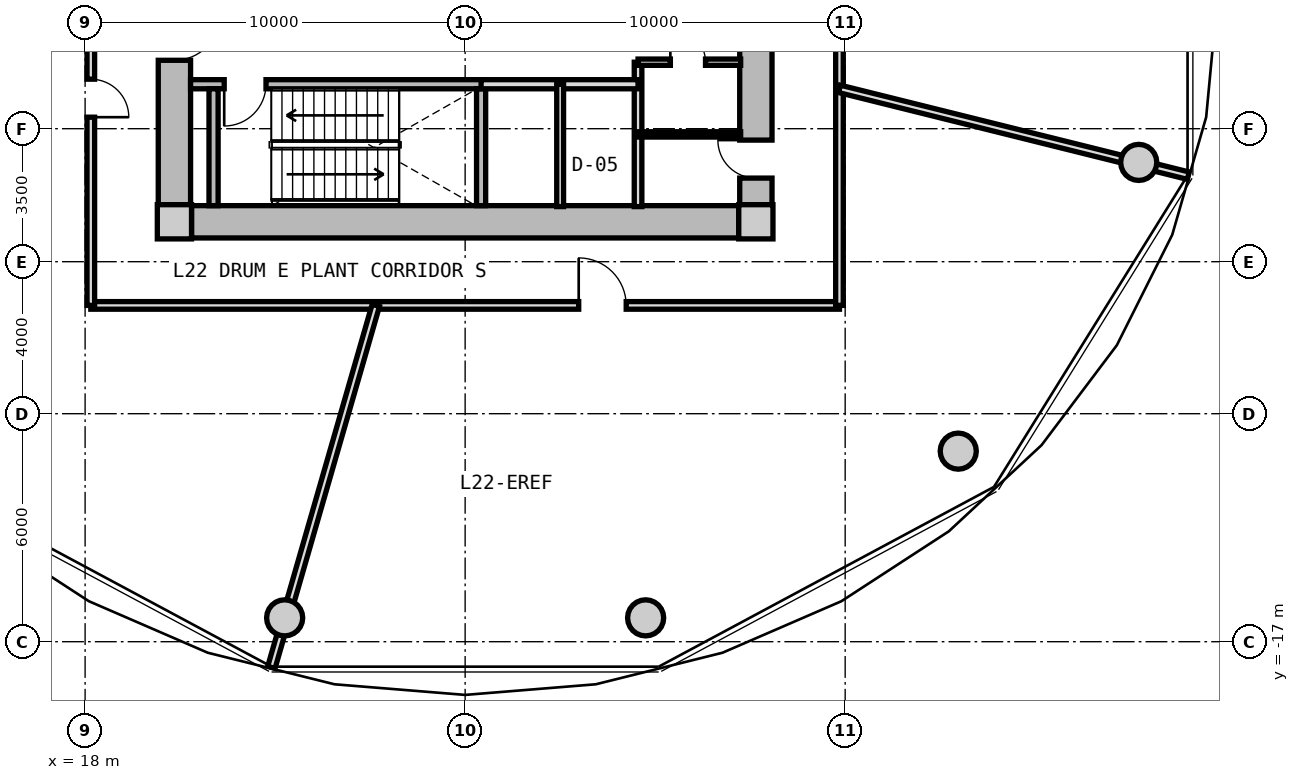
"""IFC4 building model, lengths in metres.
Left out: names, types, materials, properties, quantities, classifications, styles, units other than length and angle.
Written with IfcOpenShell. Run it as: python <this file> out.ifc"""

import sys

from ifc_helpers import new_model, si_unit, direction, frame, frame_2d, origin, origin_2d, place, context, subcontext, project, spatial, rectangle, circle, extrude, source, transform, mapped, element, fill, save


model = new_model("IFC4")
c1 = context("Model", 3, precision=1e-05, world=origin(), true_north=direction((0.0, 1.0)))
c2 = subcontext(c1, "Body", "Model", "MODEL_VIEW")
j1 = project(units=[si_unit("LENGTHUNIT", "METRE"), si_unit("PLANEANGLEUNIT", "RADIAN")], contexts=[c1])
p1 = place(None, origin())
s1 = spatial("IfcSite", under=j1, at=p1, CompositionType="ELEMENT")
p2 = place(p1, origin())
s2 = spatial("IfcBuilding", under=s1, at=p2, CompositionType="ELEMENT")
p3 = place(p2, frame((0.0, 0.0, 73.45)))
s3 = spatial("IfcBuildingStorey", under=s2, at=p3, CompositionType="ELEMENT", Elevation=73.45)
m1 = source(origin(), c2, "Body", "SweptSolid", [
    extrude(rectangle(XDim=0.9, YDim=0.9, at=origin_2d()), origin(), (0.0, 0.0, 1.0), 4.5),
])
for number, where, z_axis, x_axis in (
    (1, (20.35, -5.95, 0.0), (0.0, 0.0, 1.0), (1.0, 0.0, 0.0)),
    (2, (35.65, -5.95, 0.0), (0.0, 0.0, 1.0), (1.0, 0.0, 0.0)),
):
    element("IfcColumn", number, at=place(p3, frame(where, z_axis=z_axis, x_axis=x_axis)), inside=s3, PredefinedType="COLUMN", context=c2, shape_type="MappedRepresentation", body=[
        mapped(m1, transform((0.0, 0.0, 0.0), x_axis=(1.0, 0.0, 0.0), y_axis=(0.0, 1.0, 0.0), z_axis=(0.0, 0.0, 1.0), scale=1.0)),
    ])
m2 = source(origin(), c2, "Body", "SweptSolid", [
    extrude(rectangle(XDim=14.4, YDim=0.85, at=frame_2d((7.2, 0.0))), origin(), (0.0, 0.0, 1.0), 4.08),
])
p4 = place(p3, frame((35.2, -5.95, 0.0), z_axis=(0.0, 0.0, 1.0), x_axis=(-1.0, 0.0, 0.0)))
e3 = element("IfcWall", 3, at=p4, inside=s3, PredefinedType="SHEAR", context=c2, shape_type="MappedRepresentation", body=[
    mapped(m2, transform((0.0, 0.0, 0.0), x_axis=(1.0, 0.0, 0.0), y_axis=(0.0, 1.0, 0.0), z_axis=(0.0, 0.0, 1.0), scale=1.0)),
])
m3 = source(origin(), c2, "Body", "SweptSolid", [
    extrude(rectangle(XDim=11.0, YDim=0.85, at=frame_2d((5.5, 0.0))), origin(), (0.0, 0.0, 1.0), 4.08),
])
p5 = place(p3, frame((20.35, -5.5, 0.0), z_axis=(0.0, 0.0, 1.0), x_axis=(0.0, 1.0, 0.0)))
e4 = element("IfcWall", 4, at=p5, inside=s3, PredefinedType="SHEAR", context=c2, shape_type="MappedRepresentation", body=[
    mapped(m3, transform((0.0, 0.0, 0.0), x_axis=(1.0, 0.0, 0.0), y_axis=(0.0, 1.0, 0.0), z_axis=(0.0, 0.0, 1.0), scale=1.0)),
])
p6 = place(p5, frame((3.8, 0.0, 0.0)))
e5 = element("IfcOpeningElement", 5, at=p6, cuts=e4, PredefinedType="OPENING", context=c2, shape_type="SweptSolid", body=[
    extrude(rectangle(XDim=1.2, YDim=2.15, at=frame_2d((0.6, 1.075))), frame((0.0, 0.435, 0.0), z_axis=(0.0, -1.0, 0.0), x_axis=(1.0, 0.0, 0.0)), (0.0, 0.0, 1.0), 0.87),
])
p7 = place(p3, frame((35.65, 5.5, 0.0), z_axis=(0.0, 0.0, 1.0), x_axis=(0.0, -1.0, 0.0)))
e6 = element("IfcWall", 6, at=p7, inside=s3, PredefinedType="SHEAR", context=c2, shape_type="MappedRepresentation", body=[
    mapped(m3, transform((0.0, 0.0, 0.0), x_axis=(1.0, 0.0, 0.0), y_axis=(0.0, 1.0, 0.0), z_axis=(0.0, 0.0, 1.0), scale=1.0)),
])
p8 = place(p7, frame((5.65, 0.0, 0.0)))
e7 = element("IfcOpeningElement", 7, at=p8, cuts=e6, PredefinedType="OPENING", context=c2, shape_type="SweptSolid", body=[
    extrude(rectangle(XDim=1.2, YDim=2.15, at=frame_2d((0.6, 1.075))), frame((0.0, 0.435, 0.0), z_axis=(0.0, -1.0, 0.0), x_axis=(1.0, 0.0, 0.0)), (0.0, 0.0, 1.0), 0.87),
])
p9 = place(p7, frame((9.3, 0.0, 0.0)))
e8 = element("IfcOpeningElement", 8, at=p9, cuts=e6, PredefinedType="OPENING", context=c2, shape_type="SweptSolid", body=[
    extrude(rectangle(XDim=1.0, YDim=2.1, at=frame_2d((0.5, 1.05))), frame((0.0, 0.435, 0.0), z_axis=(0.0, -1.0, 0.0), x_axis=(1.0, 0.0, 0.0)), (0.0, 0.0, 1.0), 0.87),
])
m4 = source(origin(), c2, "Body", "SweptSolid", [
    extrude(circle(Radius=0.475, at=origin_2d()), origin(), (0.0, 0.0, 1.0), 4.08),
])
for number, where, z_axis, x_axis in (
    (9, (23.251, -16.373, 0.0), (0.0, 0.0, 1.0), (1.0, 0.0, 0.0)),
    (10, (32.749, -16.373, 0.0), (0.0, 0.0, 1.0), (1.0, 0.0, 0.0)),
    (11, (40.975, -11.985, 0.0), (0.0, 0.0, 1.0), (1.0, 0.0, 0.0)),
    (12, (45.725, -4.387, 0.0), (0.0, 0.0, 1.0), (1.0, 0.0, 0.0)),
):
    element("IfcColumn", number, at=place(p3, frame(where, z_axis=z_axis, x_axis=x_axis)), inside=s3, PredefinedType="COLUMN", context=c2, shape_type="MappedRepresentation", body=[
        mapped(m4, transform((0.0, 0.0, 0.0), x_axis=(1.0, 0.0, 0.0), y_axis=(0.0, 1.0, 0.0), z_axis=(0.0, 0.0, 1.0), scale=1.0)),
    ])
m5 = source(origin(), c2, "Body", "SweptSolid", [
    extrude(rectangle(XDim=7.765, YDim=0.24, at=frame_2d((3.883, 0.0))), origin(), (0.0, 0.0, 1.0), 4.08),
])
p10 = place(p3, frame((20.775, -2.33, 0.0), z_axis=(0.0, 0.0, 1.0), x_axis=(1.0, 0.0, 0.0)))
e13 = element("IfcWall", 13, at=p10, inside=s3, PredefinedType="PARTITIONING", context=c2, shape_type="MappedRepresentation", body=[
    mapped(m5, transform((0.0, 0.0, 0.0), x_axis=(1.0, 0.0, 0.0), y_axis=(0.0, 1.0, 0.0), z_axis=(0.0, 0.0, 1.0), scale=1.0)),
])
p11 = place(p10, frame((0.885, 0.0, 0.0)))
e14 = element("IfcOpeningElement", 14, at=p11, cuts=e13, PredefinedType="OPENING", context=c2, shape_type="SweptSolid", body=[
    extrude(rectangle(XDim=1.1, YDim=2.15, at=frame_2d((0.55, 1.075))), frame((0.0, 0.13, 0.0), z_axis=(0.0, -1.0, 0.0), x_axis=(1.0, 0.0, 0.0)), (0.0, 0.0, 1.0), 0.26),
])
m6 = source(origin(), c2, "Body", "SweptSolid", [
    extrude(rectangle(XDim=3.075, YDim=0.24, at=frame_2d((1.538, 0.0))), origin(), (0.0, 0.0, 1.0), 4.08),
])
for number, where, z_axis, x_axis in (
    (15, (21.38, -5.525, 0.0), (0.0, 0.0, 1.0), (0.0, 1.0, 0.0)),
    (16, (28.42, -5.525, 0.0), (0.0, 0.0, 1.0), (0.0, 1.0, 0.0)),
):
    element("IfcWall", number, at=place(p3, frame(where, z_axis=z_axis, x_axis=x_axis)), inside=s3, PredefinedType="PARTITIONING", context=c2, shape_type="MappedRepresentation", body=[
        mapped(m6, transform((0.0, 0.0, 0.0), x_axis=(1.0, 0.0, 0.0), y_axis=(0.0, 1.0, 0.0), z_axis=(0.0, 0.0, 1.0), scale=1.0)),
    ])
m7 = source(origin(), c2, "Body", "SweptSolid", [
    extrude(rectangle(XDim=3.8, YDim=0.2, at=frame_2d((1.9, 0.0))), origin(), (0.0, 0.0, 1.0), 4.065),
])
p12 = place(p3, frame((32.55, -5.55, 0.0), z_axis=(0.0, 0.0, 1.0), x_axis=(0.0, 1.0, 0.0)))
e17 = element("IfcWall", 17, at=p12, inside=s3, PredefinedType="PARTITIONING", context=c2, shape_type="MappedRepresentation", body=[
    mapped(m7, transform((0.0, 0.0, 0.0), x_axis=(1.0, 0.0, 0.0), y_axis=(0.0, 1.0, 0.0), z_axis=(0.0, 0.0, 1.0), scale=1.0)),
])
m8 = source(origin(), c2, "Body", "SweptSolid", [
    extrude(rectangle(XDim=4.13, YDim=0.24, at=frame_2d((2.065, 0.0))), origin(), (0.0, 0.0, 1.0), 4.065),
])
p13 = place(p3, frame((28.42, -2.33, 0.0), z_axis=(0.0, 0.0, 1.0), x_axis=(1.0, 0.0, 0.0)))
e18 = element("IfcWall", 18, at=p13, inside=s3, PredefinedType="PARTITIONING", context=c2, shape_type="MappedRepresentation", body=[
    mapped(m8, transform((0.0, 0.0, 0.0), x_axis=(1.0, 0.0, 0.0), y_axis=(0.0, 1.0, 0.0), z_axis=(0.0, 0.0, 1.0), scale=1.0)),
])
m9 = source(origin(), c2, "Body", "SweptSolid", [
    extrude(rectangle(XDim=3.22, YDim=0.18, at=frame_2d((1.61, 0.0))), origin(), (0.0, 0.0, 1.0), 4.065),
])
p14 = place(p3, frame((30.5, -5.55, 0.0), z_axis=(0.0, 0.0, 1.0), x_axis=(0.0, 1.0, 0.0)))
e19 = element("IfcWall", 19, at=p14, inside=s3, PredefinedType="PARTITIONING", context=c2, shape_type="MappedRepresentation", body=[
    mapped(m9, transform((0.0, 0.0, 0.0), x_axis=(1.0, 0.0, 0.0), y_axis=(0.0, 1.0, 0.0), z_axis=(0.0, 0.0, 1.0), scale=1.0)),
])
m10 = source(origin(), c2, "Body", "SweptSolid", [
    extrude(rectangle(XDim=2.7, YDim=0.165, at=frame_2d((1.35, 0.0))), origin(), (0.0, 0.0, 1.0), 4.065),
])
p15 = place(p3, frame((32.55, -1.75, 0.0), z_axis=(0.0, 0.0, 1.0), x_axis=(1.0, 0.0, 0.0)))
e20 = element("IfcWall", 20, at=p15, inside=s3, PredefinedType="PARTITIONING", context=c2, shape_type="MappedRepresentation", body=[
    mapped(m10, transform((0.0, 0.0, 0.0), x_axis=(1.0, 0.0, 0.0), y_axis=(0.0, 1.0, 0.0), z_axis=(0.0, 0.0, 1.0), scale=1.0)),
])
p16 = place(p15, frame((0.85, 0.0, 0.0)))
e21 = element("IfcOpeningElement", 21, at=p16, cuts=e20, PredefinedType="OPENING", context=c2, shape_type="SweptSolid", body=[
    extrude(rectangle(XDim=0.925, YDim=2.1, at=frame_2d((0.462, 1.05))), frame((0.0, 0.093, 0.0), z_axis=(0.0, -1.0, 0.0), x_axis=(1.0, 0.0, 0.0)), (0.0, 0.0, 1.0), 0.185),
])
m11 = source(origin(), c2, "Body", "SweptSolid", [
    extrude(rectangle(XDim=2.7, YDim=0.14, at=frame_2d((1.35, 0.0))), origin(), (0.0, 0.0, 1.0), 4.065),
])
p17 = place(p3, frame((32.55, -3.65, 0.0), z_axis=(0.0, 0.0, 1.0), x_axis=(1.0, 0.0, 0.0)))
e22 = element("IfcWall", 22, at=p17, inside=s3, PredefinedType="PARTITIONING", context=c2, shape_type="MappedRepresentation", body=[
    mapped(m11, transform((0.0, 0.0, 0.0), x_axis=(1.0, 0.0, 0.0), y_axis=(0.0, 1.0, 0.0), z_axis=(0.0, 0.0, 1.0), scale=1.0)),
])
m12 = source(origin(), c2, "Body", "SweptSolid", [
    extrude(rectangle(XDim=19.7, YDim=0.2, at=frame_2d((9.85, 0.0))), origin(), (0.0, 0.0, 1.0), 4.065),
])
p18 = place(p3, frame((37.85, -8.15, 0.0), z_axis=(0.0, 0.0, 1.0), x_axis=(-1.0, 0.0, 0.0)))
e23 = element("IfcWall", 23, at=p18, inside=s3, PredefinedType="PARTITIONING", context=c2, shape_type="MappedRepresentation", body=[
    mapped(m12, transform((0.0, 0.0, 0.0), x_axis=(1.0, 0.0, 0.0), y_axis=(0.0, 1.0, 0.0), z_axis=(0.0, 0.0, 1.0), scale=1.0)),
])
p19 = place(p18, frame((5.612, 0.0, 0.0)))
e24 = element("IfcOpeningElement", 24, at=p19, cuts=e23, PredefinedType="OPENING", context=c2, shape_type="SweptSolid", body=[
    extrude(rectangle(XDim=1.25, YDim=2.2, at=frame_2d((0.625, 1.1))), frame((0.0, 0.11, 0.0), z_axis=(0.0, -1.0, 0.0), x_axis=(1.0, 0.0, 0.0)), (0.0, 0.0, 1.0), 0.22),
])
m13 = source(origin(), c2, "Body", "SweptSolid", [
    extrude(rectangle(XDim=16.3, YDim=0.2, at=frame_2d((8.15, 0.0))), origin(), (0.0, 0.0, 1.0), 4.065),
])
p20 = place(p3, frame((18.15, -8.15, 0.0), z_axis=(0.0, 0.0, 1.0), x_axis=(0.0, 1.0, 0.0)))
e25 = element("IfcWall", 25, at=p20, inside=s3, PredefinedType="PARTITIONING", context=c2, shape_type="MappedRepresentation", body=[
    mapped(m13, transform((0.0, 0.0, 0.0), x_axis=(1.0, 0.0, 0.0), y_axis=(0.0, 1.0, 0.0), z_axis=(0.0, 0.0, 1.0), scale=1.0)),
])
p21 = place(p20, frame((4.953, 0.0, 0.0)))
e26 = element("IfcOpeningElement", 26, at=p21, cuts=e25, PredefinedType="OPENING", context=c2, shape_type="SweptSolid", body=[
    extrude(rectangle(XDim=1.0, YDim=2.1, at=frame_2d((0.5, 1.05))), frame((0.0, 0.11, 0.0), z_axis=(0.0, -1.0, 0.0), x_axis=(1.0, 0.0, 0.0)), (0.0, 0.0, 1.0), 0.22),
])
p22 = place(p3, frame((37.85, 8.15, 0.0), z_axis=(0.0, 0.0, 1.0), x_axis=(0.0, -1.0, 0.0)))
e27 = element("IfcWall", 27, at=p22, inside=s3, PredefinedType="PARTITIONING", context=c2, shape_type="MappedRepresentation", body=[
    mapped(m13, transform((0.0, 0.0, 0.0), x_axis=(1.0, 0.0, 0.0), y_axis=(0.0, 1.0, 0.0), z_axis=(0.0, 0.0, 1.0), scale=1.0)),
])
p23 = place(p22, frame((4.953, 0.0, 0.0)))
e28 = element("IfcOpeningElement", 28, at=p23, cuts=e27, PredefinedType="OPENING", context=c2, shape_type="SweptSolid", body=[
    extrude(rectangle(XDim=1.0, YDim=2.1, at=frame_2d((0.5, 1.05))), frame((0.0, 0.11, 0.0), z_axis=(0.0, -1.0, 0.0), x_axis=(1.0, 0.0, 0.0)), (0.0, 0.0, 1.0), 0.22),
])
m14 = source(origin(), c2, "Body", "SweptSolid", [
    extrude(rectangle(XDim=9.915, YDim=0.2, at=frame_2d((4.958, 0.0))), origin(), (0.0, 0.0, 1.0), 4.065),
])
p24 = place(p3, frame((25.649, -8.15, 0.0), z_axis=(0.0, 0.0, 1.0), x_axis=(-0.277136607861, -0.960830526463, 0.0)))
e29 = element("IfcWall", 29, at=p24, inside=s3, PredefinedType="PARTITIONING", context=c2, shape_type="MappedRepresentation", body=[
    mapped(m14, transform((0.0, 0.0, 0.0), x_axis=(1.0, 0.0, 0.0), y_axis=(0.0, 1.0, 0.0), z_axis=(0.0, 0.0, 1.0), scale=1.0)),
])
m15 = source(origin(), c2, "Body", "SweptSolid", [
    extrude(rectangle(XDim=9.459, YDim=0.2, at=frame_2d((4.729, 0.0))), origin(), (0.0, 0.0, 1.0), 2.515),
])
p25 = place(p3, frame((37.85, -2.452, 0.0), z_axis=(0.0, 0.0, 1.0), x_axis=(0.970390989268, -0.241539495626, 0.0)))
e30 = element("IfcWall", 30, at=p25, inside=s3, PredefinedType="PARTITIONING", context=c2, shape_type="MappedRepresentation", body=[
    mapped(m15, transform((0.0, 0.0, 0.0), x_axis=(1.0, 0.0, 0.0), y_axis=(0.0, 1.0, 0.0), z_axis=(0.0, 0.0, 1.0), scale=1.0)),
])
m16 = source(origin(), c2, "Body", "SweptSolid", [
    extrude(rectangle(XDim=1.1, YDim=2.15, at=frame_2d((0.55, 1.075))), frame((0.0, 0.025, 0.0), z_axis=(0.0, -1.0, 0.0), x_axis=(1.0, 0.0, 0.0)), (0.0, 0.0, 1.0), 0.05),
])
p26 = place(p11, frame((1.1, 0.0, 0.0), z_axis=(0.0, 0.0, 1.0), x_axis=(-1.0, 0.0, 0.0)))
e31 = element("IfcDoor", 31, at=p26, inside=s3, OperationType="SINGLE_SWING_RIGHT", PredefinedType="DOOR", context=c2, shape_type="MappedRepresentation", body=[
    mapped(m16, transform((0.0, 0.0, 0.0), x_axis=(1.0, 0.0, 0.0), y_axis=(0.0, 1.0, 0.0), z_axis=(0.0, 0.0, 1.0), scale=1.0)),
])
fill(e14, e31)
m17 = source(origin(), c2, "Body", "SweptSolid", [
    extrude(rectangle(XDim=1.2, YDim=2.15, at=frame_2d((0.6, 1.075))), frame((0.0, 0.025, 0.0), z_axis=(0.0, -1.0, 0.0), x_axis=(1.0, 0.0, 0.0)), (0.0, 0.0, 1.0), 0.05),
])
p27 = place(p6, frame((1.2, 0.0, 0.0), z_axis=(0.0, 0.0, 1.0), x_axis=(-1.0, 0.0, 0.0)))
e32 = element("IfcDoor", 32, at=p27, inside=s3, OperationType="SINGLE_SWING_LEFT", PredefinedType="DOOR", context=c2, shape_type="MappedRepresentation", body=[
    mapped(m17, transform((0.0, 0.0, 0.0), x_axis=(1.0, 0.0, 0.0), y_axis=(0.0, 1.0, 0.0), z_axis=(0.0, 0.0, 1.0), scale=1.0)),
])
fill(e5, e32)
m18 = source(origin(), c2, "Body", "SweptSolid", [
    extrude(rectangle(XDim=0.925, YDim=2.1, at=frame_2d((0.462, 1.05))), frame((0.0, 0.025, 0.0), z_axis=(0.0, -1.0, 0.0), x_axis=(1.0, 0.0, 0.0)), (0.0, 0.0, 1.0), 0.05),
])
p28 = place(p16, origin())
e33 = element("IfcDoor", 33, at=p28, inside=s3, OperationType="SINGLE_SWING_LEFT", PredefinedType="DOOR", context=c2, shape_type="MappedRepresentation", body=[
    mapped(m18, transform((0.0, 0.0, 0.0), x_axis=(1.0, 0.0, 0.0), y_axis=(0.0, 1.0, 0.0), z_axis=(0.0, 0.0, 1.0), scale=1.0)),
])
fill(e21, e33)
m19 = source(origin(), c2, "Body", "SweptSolid", [
    extrude(rectangle(XDim=1.0, YDim=2.1, at=frame_2d((0.5, 1.05))), frame((0.0, 0.025, 0.0), z_axis=(0.0, -1.0, 0.0), x_axis=(1.0, 0.0, 0.0)), (0.0, 0.0, 1.0), 0.05),
])
p29 = place(p9, frame((1.0, 0.0, 0.0), z_axis=(0.0, 0.0, 1.0), x_axis=(-1.0, 0.0, 0.0)))
e34 = element("IfcDoor", 34, at=p29, inside=s3, OperationType="SINGLE_SWING_RIGHT", PredefinedType="DOOR", context=c2, shape_type="MappedRepresentation", body=[
    mapped(m19, transform((0.0, 0.0, 0.0), x_axis=(1.0, 0.0, 0.0), y_axis=(0.0, 1.0, 0.0), z_axis=(0.0, 0.0, 1.0), scale=1.0)),
])
fill(e8, e34)
m20 = source(origin(), c2, "Body", "SweptSolid", [
    extrude(rectangle(XDim=1.25, YDim=2.2, at=frame_2d((0.625, 1.1))), frame((0.0, 0.025, 0.0), z_axis=(0.0, -1.0, 0.0), x_axis=(1.0, 0.0, 0.0)), (0.0, 0.0, 1.0), 0.05),
])
p30 = place(p19, frame((1.25, 0.0, 0.0), z_axis=(0.0, 0.0, 1.0), x_axis=(-1.0, 0.0, 0.0)))
e35 = element("IfcDoor", 35, at=p30, inside=s3, OperationType="SINGLE_SWING_LEFT", PredefinedType="DOOR", context=c2, shape_type="MappedRepresentation", body=[
    mapped(m20, transform((0.0, 0.0, 0.0), x_axis=(1.0, 0.0, 0.0), y_axis=(0.0, 1.0, 0.0), z_axis=(0.0, 0.0, 1.0), scale=1.0)),
])
fill(e24, e35)
p31 = place(p21, frame((1.0, 0.0, 0.0), z_axis=(0.0, 0.0, 1.0), x_axis=(-1.0, 0.0, 0.0)))
e36 = element("IfcDoor", 36, at=p31, inside=s3, OperationType="SINGLE_SWING_RIGHT", PredefinedType="DOOR", context=c2, shape_type="MappedRepresentation", body=[
    mapped(m19, transform((0.0, 0.0, 0.0), x_axis=(1.0, 0.0, 0.0), y_axis=(0.0, 1.0, 0.0), z_axis=(0.0, 0.0, 1.0), scale=1.0)),
])
fill(e26, e36)
save(model, sys.argv[1])
